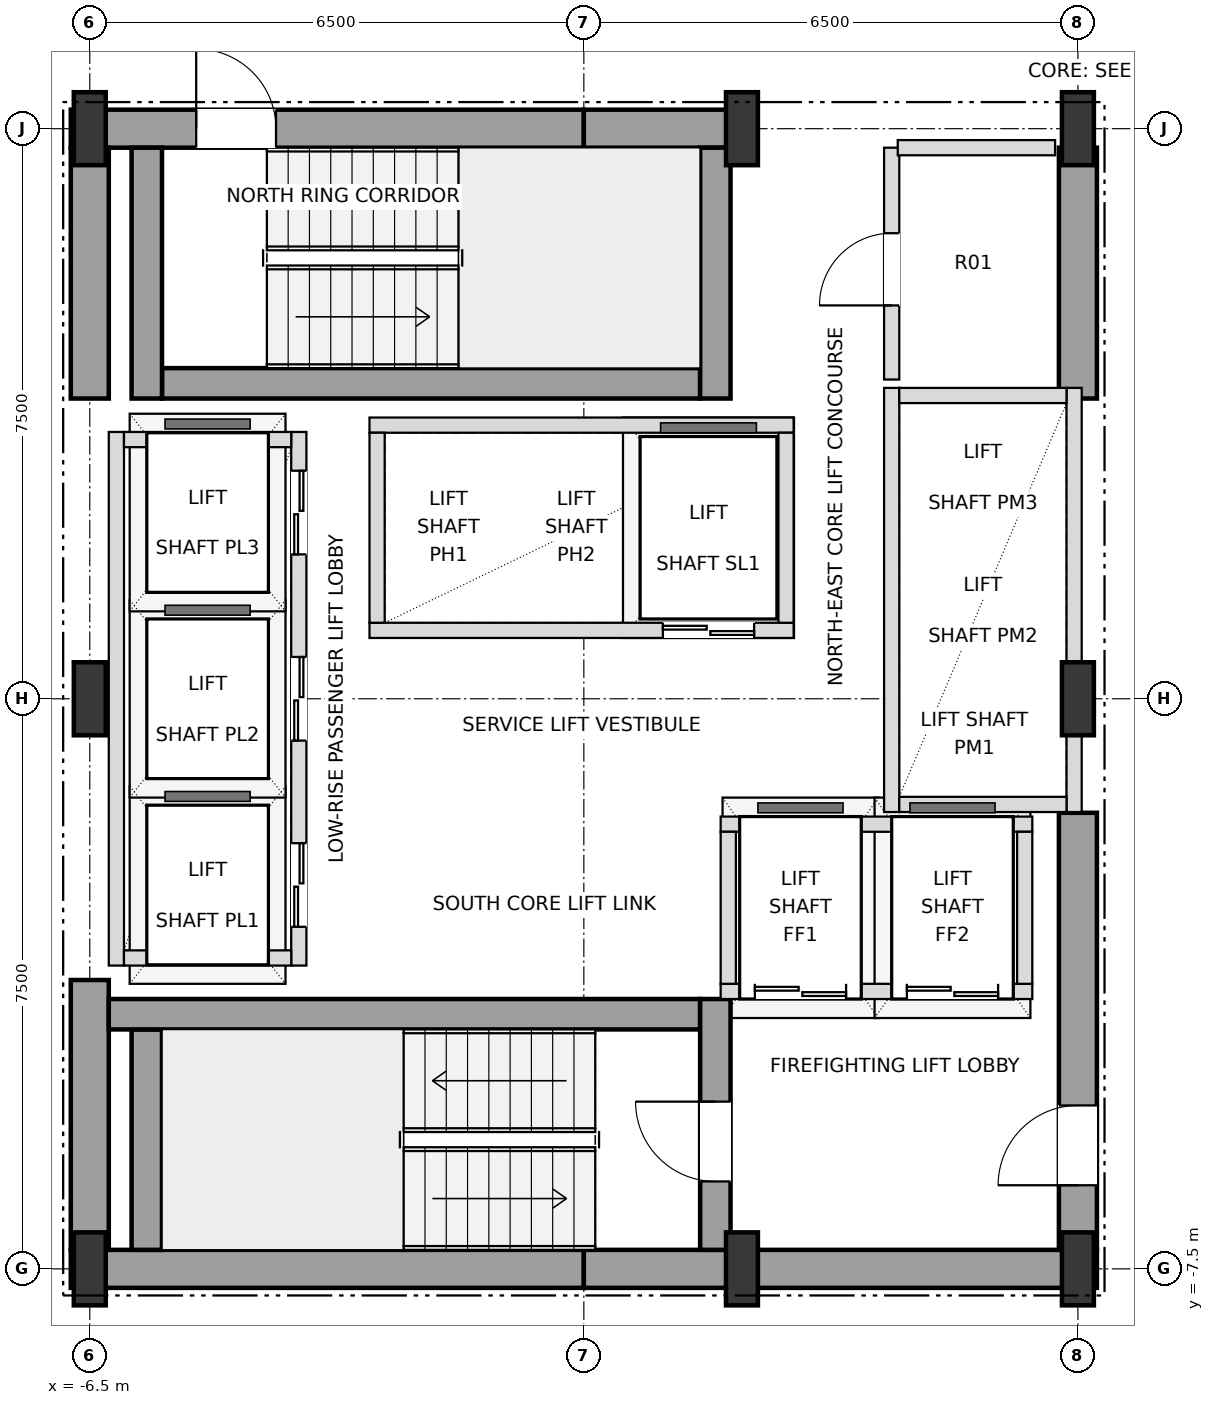
"""IFC4 building model, lengths in metres.
Left out: names, types, materials, properties, quantities, classifications, styles, units other than length and angle.
Written with IfcOpenShell. Run it as: python <this file> out.ifc"""

import sys

from ifc_helpers import new_model, si_unit, direction, frame, frame_2d, origin, origin_2d, place, context, subcontext, project, spatial, rectangle, i_section, extrude, element, fill, save


model = new_model("IFC4")
c1 = context("Model", 3, precision=1e-05, world=origin(), true_north=direction((0.0, 1.0)))
c2 = subcontext(c1, "Body", "Model", "MODEL_VIEW")
j1 = project(units=[si_unit("LENGTHUNIT", "METRE"), si_unit("PLANEANGLEUNIT", "RADIAN")], contexts=[c1])
p1 = place(None, origin())
s1 = spatial("IfcSite", under=j1, at=p1, CompositionType="ELEMENT")
p2 = place(p1, origin())
s2 = spatial("IfcBuilding", under=s1, at=p2, CompositionType="ELEMENT")
p3 = place(p2, frame((0.0, 0.0, 106.2)))
s3 = spatial("IfcBuildingStorey", under=s2, at=p3, CompositionType="ELEMENT", Elevation=106.2)
for number, where, z_axis, x_axis in (
    (1, (-6.5, -7.5, 0.0), (0.0, 0.0, 1.0), (1.0, 0.0, 0.0)),
    (2, (2.08, -7.5, 0.0), (0.0, 0.0, 1.0), (1.0, 0.0, 0.0)),
    (3, (6.5, -7.5, 0.0), (0.0, 0.0, 1.0), (1.0, 0.0, 0.0)),
    (4, (-6.5, 0.0, 0.0), (0.0, 0.0, 1.0), (1.0, 0.0, 0.0)),
    (5, (6.5, 0.0, 0.0), (0.0, 0.0, 1.0), (1.0, 0.0, 0.0)),
    (6, (-6.5, 7.5, 0.0), (0.0, 0.0, 1.0), (1.0, 0.0, 0.0)),
    (7, (2.08, 7.5, 0.0), (0.0, 0.0, 1.0), (1.0, 0.0, 0.0)),
    (8, (6.5, 7.5, 0.0), (0.0, 0.0, 1.0), (1.0, 0.0, 0.0)),
):
    element("IfcColumn", number, at=place(p3, frame(where, z_axis=z_axis, x_axis=x_axis)), inside=s3, PredefinedType="COLUMN", context=c2, shape_type="SweptSolid", body=[
        extrude(i_section(OverallWidth=0.42, OverallDepth=0.96, WebThickness=0.022, FlangeThickness=0.034, at=origin_2d()), origin(), (0.0, 0.0, 1.0), 3.6),
    ])
for number, where, z_axis, x_axis in (
    (9, (-6.75, -7.5, 0.0), (0.0, 0.0, 1.0), (1.0, 0.0, 0.0)),
    (10, (0.0, -7.5, 0.0), (0.0, 0.0, 1.0), (1.0, 0.0, 0.0)),
):
    element("IfcWall", number, at=place(p3, frame(where, z_axis=z_axis, x_axis=x_axis)), inside=s3, PredefinedType="SHEAR", context=c2, shape_type="SweptSolid", body=[
        extrude(rectangle(XDim=6.75, YDim=0.5, at=frame_2d((3.375, 0.0))), origin(), (0.0, 0.0, 1.0), 3.38),
    ])
p4 = place(p3, frame((-6.75, 7.5, 0.0), z_axis=(0.0, 0.0, 1.0), x_axis=(1.0, 0.0, 0.0)))
e11 = element("IfcWall", 11, at=p4, inside=s3, PredefinedType="SHEAR", context=c2, shape_type="SweptSolid", body=[
    extrude(rectangle(XDim=6.75, YDim=0.5, at=frame_2d((3.375, 0.0))), origin(), (0.0, 0.0, 1.0), 3.38),
])
p5 = place(p4, frame((1.65, 0.0, 0.0)))
e12 = element("IfcOpeningElement", 12, at=p5, cuts=e11, PredefinedType="OPENING", context=c2, shape_type="SweptSolid", body=[
    extrude(rectangle(XDim=1.05, YDim=2.15, at=frame_2d((0.525, 1.075))), frame((0.0, 0.26, 0.0), z_axis=(0.0, -1.0, 0.0), x_axis=(1.0, 0.0, 0.0)), (0.0, 0.0, 1.0), 0.52),
])
p6 = place(p3, frame((0.0, 7.5, 0.0), z_axis=(0.0, 0.0, 1.0), x_axis=(1.0, 0.0, 0.0)))
e13 = element("IfcWall", 13, at=p6, inside=s3, PredefinedType="SHEAR", context=c2, shape_type="SweptSolid", body=[
    extrude(rectangle(XDim=2.08, YDim=0.5, at=frame_2d((1.04, 0.0))), origin(), (0.0, 0.0, 1.0), 3.38),
])
p7 = place(p3, frame((-6.5, -7.25, 0.0), z_axis=(0.0, 0.0, 1.0), x_axis=(0.0, 1.0, 0.0)))
e14 = element("IfcWall", 14, at=p7, inside=s3, PredefinedType="SHEAR", context=c2, shape_type="SweptSolid", body=[
    extrude(rectangle(XDim=3.55, YDim=0.5, at=frame_2d((1.775, 0.0))), origin(), (0.0, 0.0, 1.0), 3.38),
])
p8 = place(p3, frame((-6.5, 3.95, 0.0), z_axis=(0.0, 0.0, 1.0), x_axis=(0.0, 1.0, 0.0)))
e15 = element("IfcWall", 15, at=p8, inside=s3, PredefinedType="SHEAR", context=c2, shape_type="SweptSolid", body=[
    extrude(rectangle(XDim=3.3, YDim=0.5, at=frame_2d((1.65, 0.0))), origin(), (0.0, 0.0, 1.0), 3.38),
])
p9 = place(p3, frame((6.5, -7.25, 0.0), z_axis=(0.0, 0.0, 1.0), x_axis=(0.0, 1.0, 0.0)))
e16 = element("IfcWall", 16, at=p9, inside=s3, PredefinedType="SHEAR", context=c2, shape_type="SweptSolid", body=[
    extrude(rectangle(XDim=5.75, YDim=0.5, at=frame_2d((2.875, 0.0))), origin(), (0.0, 0.0, 1.0), 3.38),
])
p10 = place(p9, frame((0.85, 0.0, 0.0)))
e17 = element("IfcOpeningElement", 17, at=p10, cuts=e16, PredefinedType="OPENING", context=c2, shape_type="SweptSolid", body=[
    extrude(rectangle(XDim=1.05, YDim=2.15, at=frame_2d((0.525, 1.075))), frame((0.0, 0.26, 0.0), z_axis=(0.0, -1.0, 0.0), x_axis=(1.0, 0.0, 0.0)), (0.0, 0.0, 1.0), 0.52),
])
p11 = place(p3, frame((6.5, 3.95, 0.0), z_axis=(0.0, 0.0, 1.0), x_axis=(0.0, 1.0, 0.0)))
e18 = element("IfcWall", 18, at=p11, inside=s3, PredefinedType="SHEAR", context=c2, shape_type="SweptSolid", body=[
    extrude(rectangle(XDim=3.3, YDim=0.5, at=frame_2d((1.65, 0.0))), origin(), (0.0, 0.0, 1.0), 3.38),
])
p12 = place(p3, frame((-5.75, -7.25, 0.0), z_axis=(0.0, 0.0, 1.0), x_axis=(0.0, 1.0, 0.0)))
e19 = element("IfcWall", 19, at=p12, inside=s3, PredefinedType="SHEAR", context=c2, shape_type="SweptSolid", body=[
    extrude(rectangle(XDim=2.9, YDim=0.4, at=frame_2d((1.45, 0.0))), origin(), (0.0, 0.0, 1.0), 3.38),
])
p13 = place(p3, frame((-6.25, -4.15, 0.0), z_axis=(0.0, 0.0, 1.0), x_axis=(1.0, 0.0, 0.0)))
e20 = element("IfcWall", 20, at=p13, inside=s3, PredefinedType="SHEAR", context=c2, shape_type="SweptSolid", body=[
    extrude(rectangle(XDim=7.78, YDim=0.4, at=frame_2d((3.89, 0.0))), origin(), (0.0, 0.0, 1.0), 3.38),
])
p14 = place(p3, frame((1.73, -7.25, 0.0), z_axis=(0.0, 0.0, 1.0), x_axis=(0.0, 1.0, 0.0)))
e21 = element("IfcWall", 21, at=p14, inside=s3, PredefinedType="SHEAR", context=c2, shape_type="SweptSolid", body=[
    extrude(rectangle(XDim=3.3, YDim=0.4, at=frame_2d((1.65, 0.0))), origin(), (0.0, 0.0, 1.0), 3.38),
])
p15 = place(p14, frame((0.9, 0.0, 0.0)))
e22 = element("IfcOpeningElement", 22, at=p15, cuts=e21, PredefinedType="OPENING", context=c2, shape_type="SweptSolid", body=[
    extrude(rectangle(XDim=1.05, YDim=2.15, at=frame_2d((0.525, 1.075))), frame((0.0, 0.21, 0.0), z_axis=(0.0, -1.0, 0.0), x_axis=(1.0, 0.0, 0.0)), (0.0, 0.0, 1.0), 0.42),
])
p16 = place(p3, frame((-5.55, 4.15, 0.0), z_axis=(0.0, 0.0, 1.0), x_axis=(1.0, 0.0, 0.0)))
e23 = element("IfcWall", 23, at=p16, inside=s3, PredefinedType="SHEAR", context=c2, shape_type="SweptSolid", body=[
    extrude(rectangle(XDim=7.08, YDim=0.4, at=frame_2d((3.54, 0.0))), origin(), (0.0, 0.0, 1.0), 3.38),
])
for number, where, z_axis, x_axis in (
    (24, (1.73, 3.95, 0.0), (0.0, 0.0, 1.0), (0.0, 1.0, 0.0)),
    (25, (-5.75, 3.95, 0.0), (0.0, 0.0, 1.0), (0.0, 1.0, 0.0)),
):
    element("IfcWall", number, at=place(p3, frame(where, z_axis=z_axis, x_axis=x_axis)), inside=s3, PredefinedType="SHEAR", context=c2, shape_type="SweptSolid", body=[
        extrude(rectangle(XDim=3.3, YDim=0.4, at=frame_2d((1.65, 0.0))), origin(), (0.0, 0.0, 1.0), 3.38),
    ])
p17 = place(p3, frame((-3.75, -3.51, 0.0), z_axis=(0.0, 0.0, 1.0), x_axis=(0.0, 1.0, 0.0)))
e26 = element("IfcWall", 26, at=p17, inside=s3, PredefinedType="SOLIDWALL", context=c2, shape_type="SweptSolid", body=[
    extrude(rectangle(XDim=7.02, YDim=0.2, at=frame_2d((3.51, 0.0))), origin(), (0.0, 0.0, 1.0), 3.38),
])
p18 = place(p17, frame((0.51, 0.0, 0.0)))
e27 = element("IfcOpeningElement", 27, at=p18, cuts=e26, PredefinedType="OPENING", context=c2, shape_type="SweptSolid", body=[
    extrude(rectangle(XDim=1.1, YDim=2.15, at=frame_2d((0.55, 1.075))), frame((0.0, 0.11, 0.0), z_axis=(0.0, -1.0, 0.0), x_axis=(1.0, 0.0, 0.0)), (0.0, 0.0, 1.0), 0.22),
])
p19 = place(p17, frame((2.96, 0.0, 0.0)))
e28 = element("IfcOpeningElement", 28, at=p19, cuts=e26, PredefinedType="OPENING", context=c2, shape_type="SweptSolid", body=[
    extrude(rectangle(XDim=1.1, YDim=2.15, at=frame_2d((0.55, 1.075))), frame((0.0, 0.11, 0.0), z_axis=(0.0, -1.0, 0.0), x_axis=(1.0, 0.0, 0.0)), (0.0, 0.0, 1.0), 0.22),
])
p20 = place(p17, frame((5.41, 0.0, 0.0)))
e29 = element("IfcOpeningElement", 29, at=p20, cuts=e26, PredefinedType="OPENING", context=c2, shape_type="SweptSolid", body=[
    extrude(rectangle(XDim=1.1, YDim=2.15, at=frame_2d((0.55, 1.075))), frame((0.0, 0.11, 0.0), z_axis=(0.0, -1.0, 0.0), x_axis=(1.0, 0.0, 0.0)), (0.0, 0.0, 1.0), 0.22),
])
p21 = place(p3, frame((-6.15, -3.51, 0.0), z_axis=(0.0, 0.0, 1.0), x_axis=(0.0, 1.0, 0.0)))
e30 = element("IfcWall", 30, at=p21, inside=s3, PredefinedType="SOLIDWALL", context=c2, shape_type="SweptSolid", body=[
    extrude(rectangle(XDim=7.02, YDim=0.2, at=frame_2d((3.51, 0.0))), origin(), (0.0, 0.0, 1.0), 3.38),
])
for number, where, z_axis, x_axis in (
    (31, (-6.05, -3.41, 0.0), (0.0, 0.0, 1.0), (1.0, 0.0, 0.0)),
    (32, (-6.05, 3.41, 0.0), (0.0, 0.0, 1.0), (1.0, 0.0, 0.0)),
):
    element("IfcWall", number, at=place(p3, frame(where, z_axis=z_axis, x_axis=x_axis)), inside=s3, PredefinedType="SOLIDWALL", context=c2, shape_type="SweptSolid", body=[
        extrude(rectangle(XDim=2.2, YDim=0.2, at=frame_2d((1.1, 0.0))), origin(), (0.0, 0.0, 1.0), 3.38),
    ])
p22 = place(p3, frame((4.05, -1.49, 0.0), z_axis=(0.0, 0.0, 1.0), x_axis=(0.0, 1.0, 0.0)))
e33 = element("IfcWall", 33, at=p22, inside=s3, PredefinedType="SOLIDWALL", context=c2, shape_type="SweptSolid", body=[
    extrude(rectangle(XDim=5.58, YDim=0.2, at=frame_2d((2.79, 0.0))), origin(), (0.0, 0.0, 1.0), 3.38),
])
p23 = place(p3, frame((6.45, -1.49, 0.0), z_axis=(0.0, 0.0, 1.0), x_axis=(0.0, 1.0, 0.0)))
e34 = element("IfcWall", 34, at=p23, inside=s3, PredefinedType="SOLIDWALL", context=c2, shape_type="SweptSolid", body=[
    extrude(rectangle(XDim=5.58, YDim=0.2, at=frame_2d((2.79, 0.0))), origin(), (0.0, 0.0, 1.0), 2.816),
])
for number, where, z_axis, x_axis in (
    (35, (4.15, -1.39, 0.0), (0.0, 0.0, 1.0), (1.0, 0.0, 0.0)),
    (36, (4.15, 3.99, 0.0), (0.0, 0.0, 1.0), (1.0, 0.0, 0.0)),
):
    element("IfcWall", number, at=place(p3, frame(where, z_axis=z_axis, x_axis=x_axis)), inside=s3, PredefinedType="SOLIDWALL", context=c2, shape_type="SweptSolid", body=[
        extrude(rectangle(XDim=2.2, YDim=0.2, at=frame_2d((1.1, 0.0))), origin(), (0.0, 0.0, 1.0), 3.38),
    ])
p24 = place(p3, frame((-2.82, 0.9, 0.0), z_axis=(0.0, 0.0, 1.0), x_axis=(1.0, 0.0, 0.0)))
e37 = element("IfcWall", 37, at=p24, inside=s3, PredefinedType="SOLIDWALL", context=c2, shape_type="SweptSolid", body=[
    extrude(rectangle(XDim=5.58, YDim=0.2, at=frame_2d((2.79, 0.0))), origin(), (0.0, 0.0, 1.0), 3.38),
])
p25 = place(p24, frame((3.86, 0.0, 0.0)))
e38 = element("IfcOpeningElement", 38, at=p25, cuts=e37, PredefinedType="OPENING", context=c2, shape_type="SweptSolid", body=[
    extrude(rectangle(XDim=1.2, YDim=2.2, at=frame_2d((0.6, 1.1))), frame((0.0, 0.11, 0.0), z_axis=(0.0, -1.0, 0.0), x_axis=(1.0, 0.0, 0.0)), (0.0, 0.0, 1.0), 0.22),
])
p26 = place(p3, frame((-2.82, 3.6, 0.0), z_axis=(0.0, 0.0, 1.0), x_axis=(1.0, 0.0, 0.0)))
e39 = element("IfcWall", 39, at=p26, inside=s3, PredefinedType="SOLIDWALL", context=c2, shape_type="SweptSolid", body=[
    extrude(rectangle(XDim=5.58, YDim=0.2, at=frame_2d((2.79, 0.0))), origin(), (0.0, 0.0, 1.0), 3.38),
])
for number, where, z_axis, x_axis in (
    (40, (-2.72, 1.0, 0.0), (0.0, 0.0, 1.0), (0.0, 1.0, 0.0)),
    (41, (2.66, 1.0, 0.0), (0.0, 0.0, 1.0), (0.0, 1.0, 0.0)),
):
    element("IfcWall", number, at=place(p3, frame(where, z_axis=z_axis, x_axis=x_axis)), inside=s3, PredefinedType="SOLIDWALL", context=c2, shape_type="SweptSolid", body=[
        extrude(rectangle(XDim=2.5, YDim=0.2, at=frame_2d((1.25, 0.0))), origin(), (0.0, 0.0, 1.0), 3.38),
    ])
p27 = place(p3, frame((1.8, -3.85, 0.0), z_axis=(0.0, 0.0, 1.0), x_axis=(1.0, 0.0, 0.0)))
e42 = element("IfcWall", 42, at=p27, inside=s3, PredefinedType="SOLIDWALL", context=c2, shape_type="SweptSolid", body=[
    extrude(rectangle(XDim=4.1, YDim=0.2, at=frame_2d((2.05, 0.0))), origin(), (0.0, 0.0, 1.0), 3.38),
])
p28 = place(p27, frame((0.45, 0.0, 0.0)))
e43 = element("IfcOpeningElement", 43, at=p28, cuts=e42, PredefinedType="OPENING", context=c2, shape_type="SweptSolid", body=[
    extrude(rectangle(XDim=1.2, YDim=2.2, at=frame_2d((0.6, 1.1))), frame((0.0, 0.11, 0.0), z_axis=(0.0, -1.0, 0.0), x_axis=(1.0, 0.0, 0.0)), (0.0, 0.0, 1.0), 0.22),
])
p29 = place(p27, frame((2.45, 0.0, 0.0)))
e44 = element("IfcOpeningElement", 44, at=p29, cuts=e42, PredefinedType="OPENING", context=c2, shape_type="SweptSolid", body=[
    extrude(rectangle(XDim=1.2, YDim=2.2, at=frame_2d((0.6, 1.1))), frame((0.0, 0.11, 0.0), z_axis=(0.0, -1.0, 0.0), x_axis=(1.0, 0.0, 0.0)), (0.0, 0.0, 1.0), 0.22),
])
p30 = place(p3, frame((1.8, -1.65, 0.0), z_axis=(0.0, 0.0, 1.0), x_axis=(1.0, 0.0, 0.0)))
e45 = element("IfcWall", 45, at=p30, inside=s3, PredefinedType="SOLIDWALL", context=c2, shape_type="SweptSolid", body=[
    extrude(rectangle(XDim=4.1, YDim=0.2, at=frame_2d((2.05, 0.0))), origin(), (0.0, 0.0, 1.0), 3.38),
])
for number, where, z_axis, x_axis in (
    (46, (1.9, -3.75, 0.0), (0.0, 0.0, 1.0), (0.0, 1.0, 0.0)),
    (47, (5.8, -3.75, 0.0), (0.0, 0.0, 1.0), (0.0, 1.0, 0.0)),
):
    element("IfcWall", number, at=place(p3, frame(where, z_axis=z_axis, x_axis=x_axis)), inside=s3, PredefinedType="SOLIDWALL", context=c2, shape_type="SweptSolid", body=[
        extrude(rectangle(XDim=2.0, YDim=0.2, at=frame_2d((1.0, 0.0))), origin(), (0.0, 0.0, 1.0), 3.38),
    ])
p31 = place(p3, frame((4.05, 4.2, 0.0), z_axis=(0.0, 0.0, 1.0), x_axis=(0.0, 1.0, 0.0)))
e48 = element("IfcWall", 48, at=p31, inside=s3, PredefinedType="SOLIDWALL", context=c2, shape_type="SweptSolid", body=[
    extrude(rectangle(XDim=3.05, YDim=0.2, at=frame_2d((1.525, 0.0))), origin(), (0.0, 0.0, 1.0), 3.38),
])
p32 = place(p31, frame((0.975, 0.0, 0.0)))
e49 = element("IfcOpeningElement", 49, at=p32, cuts=e48, PredefinedType="OPENING", context=c2, shape_type="SweptSolid", body=[
    extrude(rectangle(XDim=0.95, YDim=2.15, at=frame_2d((0.475, 1.075))), frame((0.0, 0.11, 0.0), z_axis=(0.0, -1.0, 0.0), x_axis=(1.0, 0.0, 0.0)), (0.0, 0.0, 1.0), 0.22),
])
p33 = place(p3, frame((4.13, 7.25, 0.0), z_axis=(0.0, 0.0, 1.0), x_axis=(1.0, 0.0, 0.0)))
e50 = element("IfcWall", 50, at=p33, inside=s3, PredefinedType="SOLIDWALL", context=c2, shape_type="SweptSolid", body=[
    extrude(rectangle(XDim=2.07, YDim=0.2, at=frame_2d((1.035, 0.0))), origin(), (0.0, 0.0, 1.0), 3.38),
])
p34 = place(p10, origin())
e51 = element("IfcDoor", 51, at=p34, inside=s3, OperationType="SINGLE_SWING_LEFT", PredefinedType="DOOR", context=c2, shape_type="SweptSolid", body=[
    extrude(rectangle(XDim=1.05, YDim=2.15, at=frame_2d((0.525, 1.075))), frame((0.0, 0.025, 0.0), z_axis=(0.0, -1.0, 0.0), x_axis=(1.0, 0.0, 0.0)), (0.0, 0.0, 1.0), 0.05),
])
fill(e17, e51)
p35 = place(p15, origin())
e52 = element("IfcDoor", 52, at=p35, inside=s3, OperationType="SINGLE_SWING_RIGHT", PredefinedType="DOOR", context=c2, shape_type="SweptSolid", body=[
    extrude(rectangle(XDim=1.05, YDim=2.15, at=frame_2d((0.525, 1.075))), frame((0.0, 0.025, 0.0), z_axis=(0.0, -1.0, 0.0), x_axis=(1.0, 0.0, 0.0)), (0.0, 0.0, 1.0), 0.05),
])
fill(e22, e52)
p36 = place(p5, origin())
e53 = element("IfcDoor", 53, at=p36, inside=s3, OperationType="SINGLE_SWING_LEFT", PredefinedType="DOOR", context=c2, shape_type="SweptSolid", body=[
    extrude(rectangle(XDim=1.05, YDim=2.15, at=frame_2d((0.525, 1.075))), frame((0.0, 0.025, 0.0), z_axis=(0.0, -1.0, 0.0), x_axis=(1.0, 0.0, 0.0)), (0.0, 0.0, 1.0), 0.05),
])
fill(e12, e53)
p37 = place(p18, origin())
e54 = element("IfcDoor", 54, at=p37, inside=s3, OperationType="DOUBLE_DOOR_SLIDING", PredefinedType="DOOR", context=c2, shape_type="SweptSolid", body=[
    extrude(rectangle(XDim=1.1, YDim=2.15, at=frame_2d((0.55, 1.075))), frame((0.0, 0.025, 0.0), z_axis=(0.0, -1.0, 0.0), x_axis=(1.0, 0.0, 0.0)), (0.0, 0.0, 1.0), 0.05),
])
fill(e27, e54)
p38 = place(p19, origin())
e55 = element("IfcDoor", 55, at=p38, inside=s3, OperationType="DOUBLE_DOOR_SLIDING", PredefinedType="DOOR", context=c2, shape_type="SweptSolid", body=[
    extrude(rectangle(XDim=1.1, YDim=2.15, at=frame_2d((0.55, 1.075))), frame((0.0, 0.025, 0.0), z_axis=(0.0, -1.0, 0.0), x_axis=(1.0, 0.0, 0.0)), (0.0, 0.0, 1.0), 0.05),
])
fill(e28, e55)
p39 = place(p20, origin())
e56 = element("IfcDoor", 56, at=p39, inside=s3, OperationType="DOUBLE_DOOR_SLIDING", PredefinedType="DOOR", context=c2, shape_type="SweptSolid", body=[
    extrude(rectangle(XDim=1.1, YDim=2.15, at=frame_2d((0.55, 1.075))), frame((0.0, 0.025, 0.0), z_axis=(0.0, -1.0, 0.0), x_axis=(1.0, 0.0, 0.0)), (0.0, 0.0, 1.0), 0.05),
])
fill(e29, e56)
p40 = place(p25, origin())
e57 = element("IfcDoor", 57, at=p40, inside=s3, OperationType="DOUBLE_DOOR_SLIDING", PredefinedType="DOOR", context=c2, shape_type="SweptSolid", body=[
    extrude(rectangle(XDim=1.2, YDim=2.2, at=frame_2d((0.6, 1.1))), frame((0.0, 0.025, 0.0), z_axis=(0.0, -1.0, 0.0), x_axis=(1.0, 0.0, 0.0)), (0.0, 0.0, 1.0), 0.05),
])
fill(e38, e57)
p41 = place(p28, origin())
e58 = element("IfcDoor", 58, at=p41, inside=s3, OperationType="DOUBLE_DOOR_SLIDING", PredefinedType="DOOR", context=c2, shape_type="SweptSolid", body=[
    extrude(rectangle(XDim=1.2, YDim=2.2, at=frame_2d((0.6, 1.1))), frame((0.0, 0.025, 0.0), z_axis=(0.0, -1.0, 0.0), x_axis=(1.0, 0.0, 0.0)), (0.0, 0.0, 1.0), 0.05),
])
fill(e43, e58)
p42 = place(p29, origin())
e59 = element("IfcDoor", 59, at=p42, inside=s3, OperationType="DOUBLE_DOOR_SLIDING", PredefinedType="DOOR", context=c2, shape_type="SweptSolid", body=[
    extrude(rectangle(XDim=1.2, YDim=2.2, at=frame_2d((0.6, 1.1))), frame((0.0, 0.025, 0.0), z_axis=(0.0, -1.0, 0.0), x_axis=(1.0, 0.0, 0.0)), (0.0, 0.0, 1.0), 0.05),
])
fill(e44, e59)
p43 = place(p32, origin())
e60 = element("IfcDoor", 60, at=p43, inside=s3, OperationType="SINGLE_SWING_LEFT", PredefinedType="DOOR", context=c2, shape_type="SweptSolid", body=[
    extrude(rectangle(XDim=0.95, YDim=2.15, at=frame_2d((0.475, 1.075))), frame((0.0, 0.025, 0.0), z_axis=(0.0, -1.0, 0.0), x_axis=(1.0, 0.0, 0.0)), (0.0, 0.0, 1.0), 0.05),
])
fill(e49, e60)
save(model, sys.argv[1])
